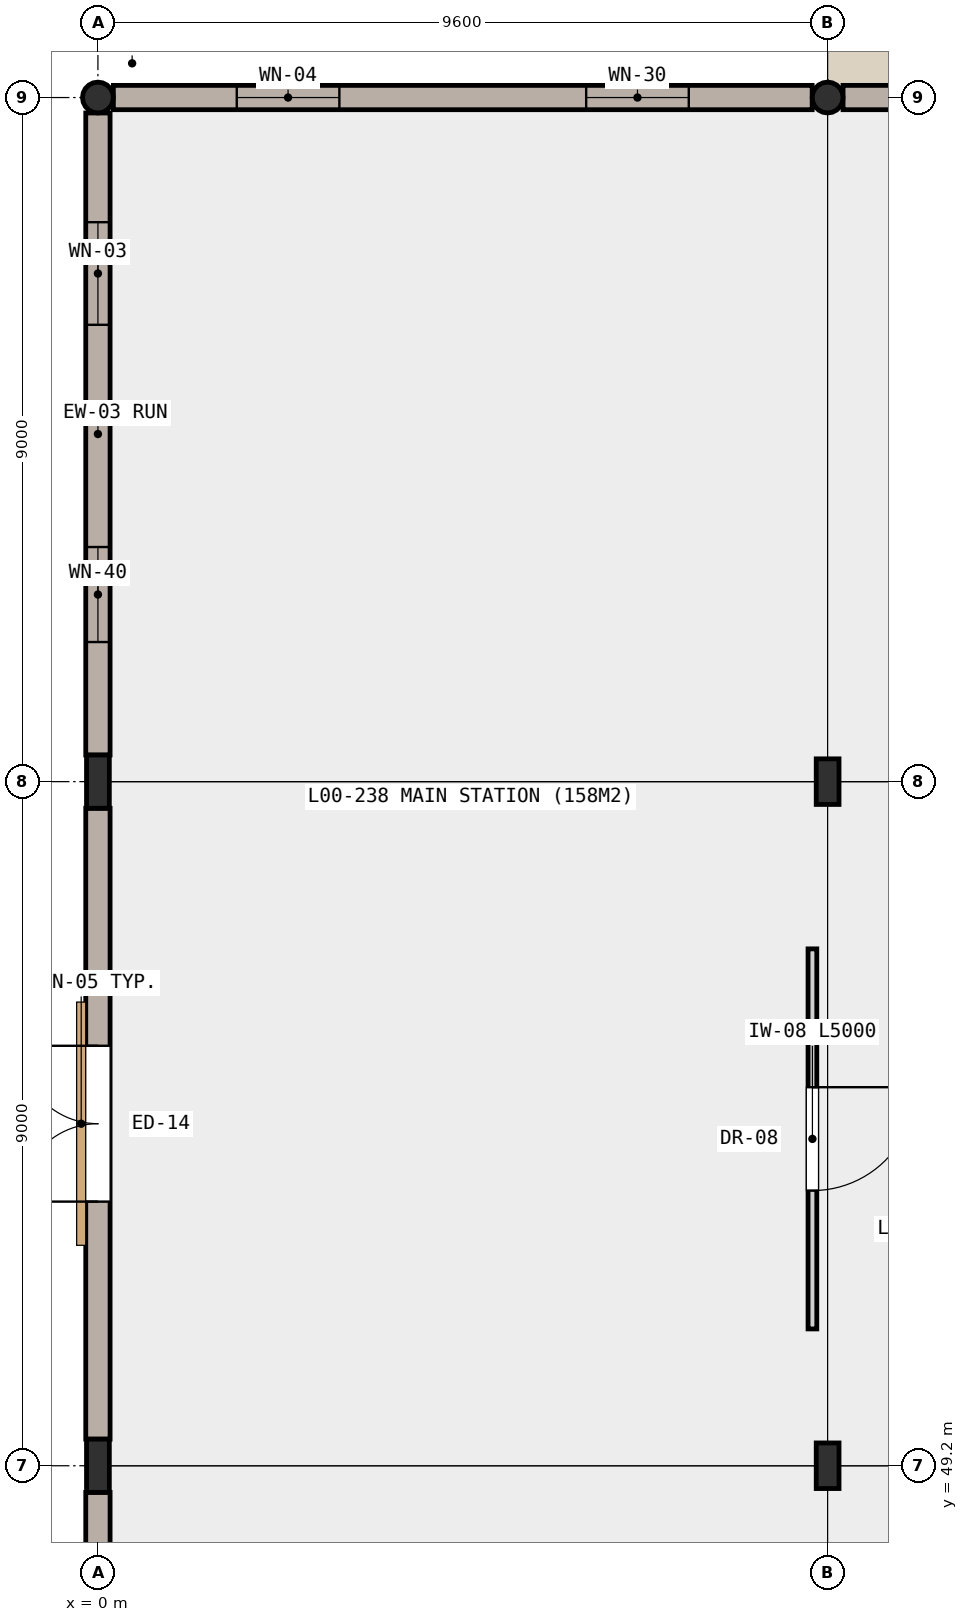
"""IFC4 building model, lengths in metres.
Left out: names, types, materials, properties, quantities, classifications, styles, units other than length and angle.
Written with IfcOpenShell. Run it as: python <this file> out.ifc"""

import sys

from ifc_helpers import new_model, si_unit, direction, frame, frame_2d, origin, origin_2d, place, context, subcontext, project, spatial, rectangle, hollow_circle, i_section, extrude, element, fill, save


model = new_model("IFC4")
c1 = context("Model", 3, precision=1e-05, world=origin(), true_north=direction((0.0, 1.0)))
c2 = subcontext(c1, "Body", "Model", "MODEL_VIEW")
j1 = project(units=[si_unit("LENGTHUNIT", "METRE"), si_unit("PLANEANGLEUNIT", "RADIAN")], contexts=[c1])
p1 = place(None, origin())
s1 = spatial("IfcSite", under=j1, at=p1, CompositionType="ELEMENT")
p2 = place(p1, origin())
s2 = spatial("IfcBuilding", under=s1, at=p2, CompositionType="ELEMENT")
p3 = place(p2, origin())
s3 = spatial("IfcBuildingStorey", under=s2, at=p3, CompositionType="ELEMENT", Elevation=0.0)
for number, where, z_axis, x_axis in (
    (1, (0.0, 49.2, 0.0), (0.0, 0.0, 1.0), (1.0, 0.0, 0.0)),
    (2, (0.0, 58.2, 0.0), (0.0, 0.0, 1.0), (1.0, 0.0, 0.0)),
):
    element("IfcColumn", number, at=place(p3, frame(where, z_axis=z_axis, x_axis=x_axis)), inside=s3, PredefinedType="COLUMN", context=c2, shape_type="SweptSolid", body=[
        extrude(i_section(OverallWidth=0.3, OverallDepth=0.7, WebThickness=0.017, FlangeThickness=0.032, FilletRadius=0.027, at=origin_2d()), origin(), (0.0, 0.0, 1.0), 5.4),
    ])
p4 = place(p3, frame((0.0, 67.2, 0.0), z_axis=(0.0, 0.0, 1.0), x_axis=(1.0, 0.0, 0.0)))
e3 = element("IfcColumn", 3, at=p4, inside=s3, PredefinedType="COLUMN", context=c2, shape_type="SweptSolid", body=[
    extrude(hollow_circle(Radius=0.203, WallThickness=0.02, at=origin_2d()), origin(), (0.0, 0.0, 1.0), 5.4),
])
for number, where, z_axis, x_axis in (
    (4, (9.6, 49.2, 0.0), (0.0, 0.0, 1.0), (1.0, 0.0, 0.0)),
    (5, (9.6, 58.2, 0.0), (0.0, 0.0, 1.0), (1.0, 0.0, 0.0)),
):
    element("IfcColumn", number, at=place(p3, frame(where, z_axis=z_axis, x_axis=x_axis)), inside=s3, PredefinedType="COLUMN", context=c2, shape_type="SweptSolid", body=[
        extrude(i_section(OverallWidth=0.3, OverallDepth=0.6, WebThickness=0.015, FlangeThickness=0.03, FilletRadius=0.027, at=origin_2d()), origin(), (0.0, 0.0, 1.0), 5.4),
    ])
p5 = place(p3, frame((9.6, 67.2, 0.0), z_axis=(0.0, 0.0, 1.0), x_axis=(1.0, 0.0, 0.0)))
e6 = element("IfcColumn", 6, at=p5, inside=s3, PredefinedType="COLUMN", context=c2, shape_type="SweptSolid", body=[
    extrude(hollow_circle(Radius=0.203, WallThickness=0.02, at=origin_2d()), origin(), (0.0, 0.0, 1.0), 5.4),
])
p6 = place(p3, frame((0.0, 40.55, 0.0), z_axis=(0.0, 0.0, 1.0), x_axis=(0.0, 1.0, 0.0)))
e7 = element("IfcWall", 7, at=p6, inside=s3, PredefinedType="SOLIDWALL", context=c2, shape_type="SweptSolid", body=[
    extrude(rectangle(XDim=8.3, YDim=0.32, at=frame_2d((4.15, 0.0))), origin(), (0.0, 0.0, 1.0), 4.69),
])
p7 = place(p6, frame((3.1, 0.0, 0.0)))
e8 = element("IfcOpeningElement", 8, at=p7, cuts=e7, PredefinedType="OPENING", context=c2, shape_type="SweptSolid", body=[
    extrude(rectangle(XDim=2.1, YDim=2.5, at=frame_2d((1.05, 1.25))), frame((0.0, 0.17, 0.0), z_axis=(0.0, -1.0, 0.0), x_axis=(1.0, 0.0, 0.0)), (0.0, 0.0, 1.0), 0.34),
])
p8 = place(p3, frame((0.0, 49.55, 0.0), z_axis=(0.0, 0.0, 1.0), x_axis=(0.0, 1.0, 0.0)))
e9 = element("IfcWall", 9, at=p8, inside=s3, PredefinedType="SOLIDWALL", context=c2, shape_type="SweptSolid", body=[
    extrude(rectangle(XDim=8.3, YDim=0.32, at=frame_2d((4.15, 0.0))), origin(), (0.0, 0.0, 1.0), 4.69),
])
p9 = place(p8, frame((3.125, 0.0, 0.0)))
e10 = element("IfcOpeningElement", 10, at=p9, cuts=e9, PredefinedType="OPENING", context=c2, shape_type="SweptSolid", body=[
    extrude(rectangle(XDim=2.05, YDim=2.45, at=frame_2d((1.025, 1.225))), frame((0.0, 0.17, 0.0), z_axis=(0.0, -1.0, 0.0), x_axis=(1.0, 0.0, 0.0)), (0.0, 0.0, 1.0), 0.34),
])
p10 = place(p3, frame((0.0, 58.55, 0.0), z_axis=(0.0, 0.0, 1.0), x_axis=(0.0, 1.0, 0.0)))
e11 = element("IfcWall", 11, at=p10, inside=s3, PredefinedType="SOLIDWALL", context=c2, shape_type="SweptSolid", body=[
    extrude(rectangle(XDim=8.447, YDim=0.32, at=frame_2d((4.223, 0.0))), origin(), (0.0, 0.0, 1.0), 4.69),
])
p11 = place(p10, frame((1.487, 0.0, 0.85)))
e12 = element("IfcOpeningElement", 12, at=p11, cuts=e11, PredefinedType="OPENING", context=c2, shape_type="SweptSolid", body=[
    extrude(rectangle(XDim=1.25, YDim=2.15, at=frame_2d((0.625, 1.075))), frame((0.0, 0.17, 0.0), z_axis=(0.0, -1.0, 0.0), x_axis=(1.0, 0.0, 0.0)), (0.0, 0.0, 1.0), 0.34),
])
p12 = place(p10, frame((5.66, 0.0, 0.85)))
e13 = element("IfcOpeningElement", 13, at=p12, cuts=e11, PredefinedType="OPENING", context=c2, shape_type="SweptSolid", body=[
    extrude(rectangle(XDim=1.35, YDim=1.5, at=frame_2d((0.675, 0.75))), frame((0.0, 0.17, 0.0), z_axis=(0.0, -1.0, 0.0), x_axis=(1.0, 0.0, 0.0)), (0.0, 0.0, 1.0), 0.34),
])
p13 = place(p3, frame((0.203, 67.2, 0.0), z_axis=(0.0, 0.0, 1.0), x_axis=(1.0, 0.0, 0.0)))
e14 = element("IfcWall", 14, at=p13, inside=s3, PredefinedType="SOLIDWALL", context=c2, shape_type="SweptSolid", body=[
    extrude(rectangle(XDim=9.194, YDim=0.32, at=frame_2d((4.597, 0.0))), origin(), (0.0, 0.0, 1.0), 4.49),
])
p14 = place(p13, frame((1.623, 0.0, 0.85)))
e15 = element("IfcOpeningElement", 15, at=p14, cuts=e14, PredefinedType="OPENING", context=c2, shape_type="SweptSolid", body=[
    extrude(rectangle(XDim=1.35, YDim=1.85, at=frame_2d((0.675, 0.925))), frame((0.0, 0.17, 0.0), z_axis=(0.0, -1.0, 0.0), x_axis=(1.0, 0.0, 0.0)), (0.0, 0.0, 1.0), 0.34),
])
p15 = place(p13, frame((6.22, 0.0, 0.85)))
e16 = element("IfcOpeningElement", 16, at=p15, cuts=e14, PredefinedType="OPENING", context=c2, shape_type="SweptSolid", body=[
    extrude(rectangle(XDim=1.35, YDim=2.15, at=frame_2d((0.675, 1.075))), frame((0.0, 0.17, 0.0), z_axis=(0.0, -1.0, 0.0), x_axis=(1.0, 0.0, 0.0)), (0.0, 0.0, 1.0), 0.34),
])
p16 = place(p3, frame((9.803, 67.2, 0.0), z_axis=(0.0, 0.0, 1.0), x_axis=(1.0, 0.0, 0.0)))
e17 = element("IfcWall", 17, at=p16, inside=s3, PredefinedType="SOLIDWALL", context=c2, shape_type="SweptSolid", body=[
    extrude(rectangle(XDim=9.194, YDim=0.32, at=frame_2d((4.597, 0.0))), origin(), (0.0, 0.0, 1.0), 4.49),
])
p17 = place(p16, frame((1.573, 0.0, 0.85)))
e18 = element("IfcOpeningElement", 18, at=p17, cuts=e17, PredefinedType="OPENING", context=c2, shape_type="SweptSolid", body=[
    extrude(rectangle(XDim=1.45, YDim=1.5, at=frame_2d((0.725, 0.75))), frame((0.0, 0.17, 0.0), z_axis=(0.0, -1.0, 0.0), x_axis=(1.0, 0.0, 0.0)), (0.0, 0.0, 1.0), 0.34),
])
p18 = place(p16, frame((6.17, 0.0, 0.85)))
e19 = element("IfcOpeningElement", 19, at=p18, cuts=e17, PredefinedType="OPENING", context=c2, shape_type="SweptSolid", body=[
    extrude(rectangle(XDim=1.45, YDim=1.85, at=frame_2d((0.725, 0.925))), frame((0.0, 0.17, 0.0), z_axis=(0.0, -1.0, 0.0), x_axis=(1.0, 0.0, 0.0)), (0.0, 0.0, 1.0), 0.34),
])
p19 = place(p3, frame((9.4, 56.0, 0.0), z_axis=(0.0, 0.0, 1.0), x_axis=(0.0, -1.0, 0.0)))
e20 = element("IfcWall", 20, at=p19, inside=s3, PredefinedType="PARTITIONING", context=c2, shape_type="SweptSolid", body=[
    extrude(rectangle(XDim=5.0, YDim=0.115, at=frame_2d((2.5, 0.0))), origin(), (0.0, 0.0, 1.0), 4.54),
])
p20 = place(p19, frame((1.82, 0.0, 0.0)))
e21 = element("IfcOpeningElement", 21, at=p20, cuts=e20, PredefinedType="OPENING", context=c2, shape_type="SweptSolid", body=[
    extrude(rectangle(XDim=1.36, YDim=2.18, at=frame_2d((0.68, 1.09))), frame((0.0, 0.067, 0.0), z_axis=(0.0, -1.0, 0.0), x_axis=(1.0, 0.0, 0.0)), (0.0, 0.0, 1.0), 0.135),
])
p21 = place(p9, origin())
e22 = element("IfcDoor", 22, at=p21, inside=s3, OperationType="DOUBLE_DOOR_SINGLE_SWING", PredefinedType="DOOR", context=c2, shape_type="SweptSolid", body=[
    extrude(rectangle(XDim=2.05, YDim=2.45, at=frame_2d((1.025, 1.225))), frame((0.0, 0.025, 0.0), z_axis=(0.0, -1.0, 0.0), x_axis=(1.0, 0.0, 0.0)), (0.0, 0.0, 1.0), 0.05),
])
fill(e10, e22)
p22 = place(p11, origin())
e23 = element("IfcWindow", 23, at=p22, inside=s3, PartitioningType="SINGLE_PANEL", PredefinedType="WINDOW", context=c2, shape_type="SweptSolid", body=[
    extrude(rectangle(XDim=1.25, YDim=2.15, at=frame_2d((0.625, 1.075))), frame((0.0, 0.03, 0.0), z_axis=(0.0, -1.0, 0.0), x_axis=(1.0, 0.0, 0.0)), (0.0, 0.0, 1.0), 0.06),
])
fill(e12, e23)
p23 = place(p12, origin())
e24 = element("IfcWindow", 24, at=p23, inside=s3, PartitioningType="SINGLE_PANEL", PredefinedType="WINDOW", context=c2, shape_type="SweptSolid", body=[
    extrude(rectangle(XDim=1.35, YDim=1.5, at=frame_2d((0.675, 0.75))), frame((0.0, 0.03, 0.0), z_axis=(0.0, -1.0, 0.0), x_axis=(1.0, 0.0, 0.0)), (0.0, 0.0, 1.0), 0.06),
])
fill(e13, e24)
p24 = place(p14, origin())
e25 = element("IfcWindow", 25, at=p24, inside=s3, PartitioningType="SINGLE_PANEL", PredefinedType="WINDOW", context=c2, shape_type="SweptSolid", body=[
    extrude(rectangle(XDim=1.35, YDim=1.85, at=frame_2d((0.675, 0.925))), frame((0.0, 0.03, 0.0), z_axis=(0.0, -1.0, 0.0), x_axis=(1.0, 0.0, 0.0)), (0.0, 0.0, 1.0), 0.06),
])
fill(e15, e25)
p25 = place(p15, origin())
e26 = element("IfcWindow", 26, at=p25, inside=s3, PartitioningType="SINGLE_PANEL", PredefinedType="WINDOW", context=c2, shape_type="SweptSolid", body=[
    extrude(rectangle(XDim=1.35, YDim=2.15, at=frame_2d((0.675, 1.075))), frame((0.0, 0.03, 0.0), z_axis=(0.0, -1.0, 0.0), x_axis=(1.0, 0.0, 0.0)), (0.0, 0.0, 1.0), 0.06),
])
fill(e16, e26)
p26 = place(p20, origin())
e27 = element("IfcDoor", 27, at=p26, inside=s3, OperationType="SINGLE_SWING_LEFT", PredefinedType="DOOR", context=c2, shape_type="SweptSolid", body=[
    extrude(rectangle(XDim=1.36, YDim=2.18, at=frame_2d((0.68, 1.09))), frame((0.0, 0.025, 0.0), z_axis=(0.0, -1.0, 0.0), x_axis=(1.0, 0.0, 0.0)), (0.0, 0.0, 1.0), 0.05),
])
fill(e21, e27)
save(model, sys.argv[1])
